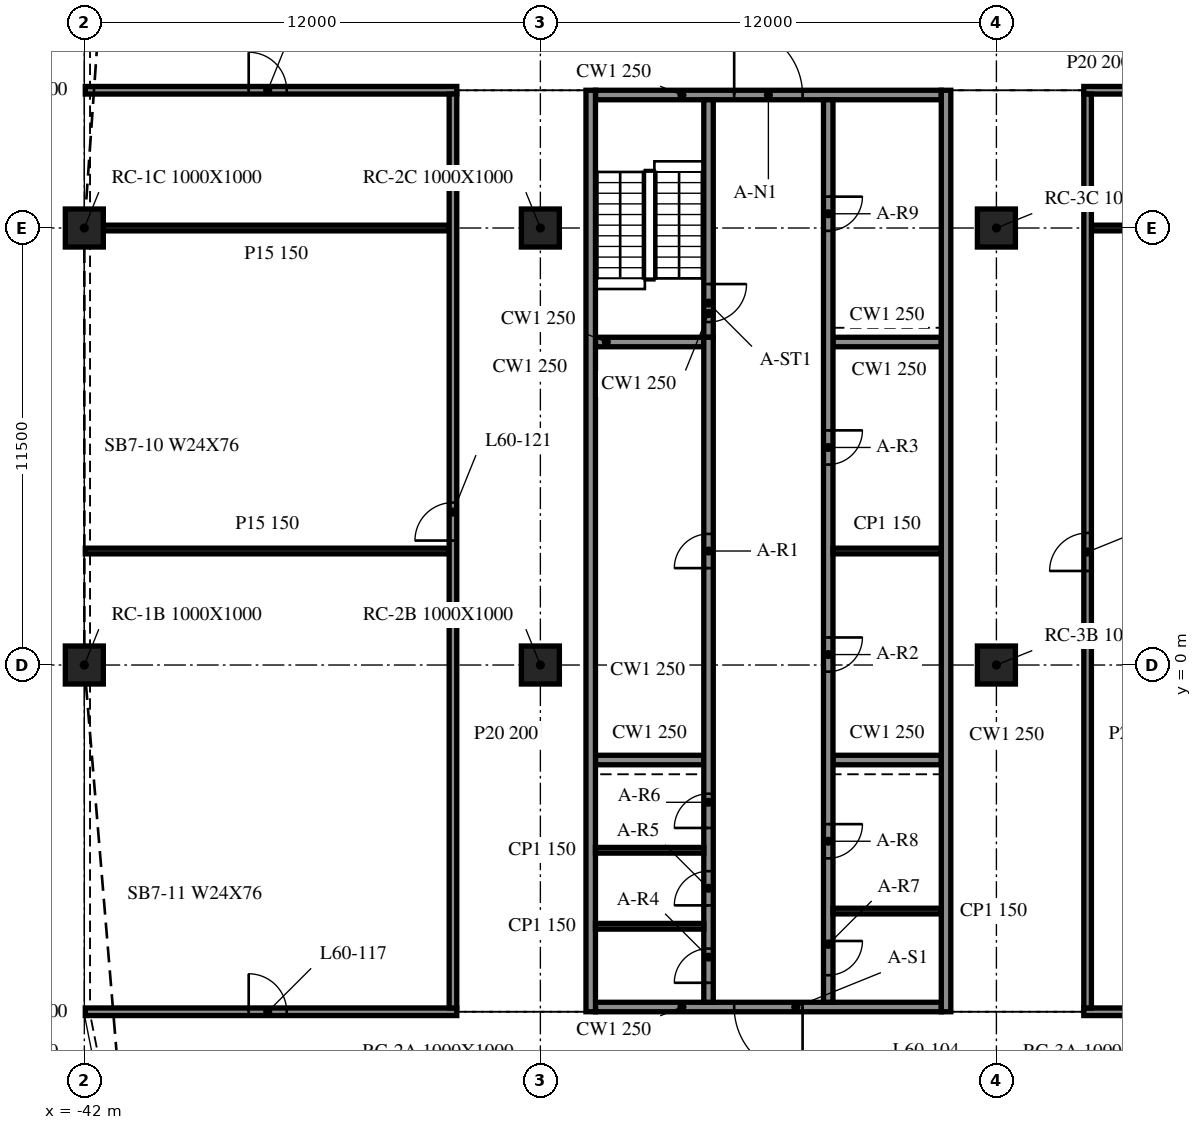
"""IFC4 building model, lengths in metres.
Left out: names, types, materials, properties, quantities, classifications, styles, units other than length and angle.
Written with IfcOpenShell. Run it as: python <this file> out.ifc"""

import sys

from ifc_helpers import new_model, si_unit, direction, frame, frame_2d, origin, origin_2d, place, context, subcontext, project, spatial, rectangle, extrude, element, fill, save


model = new_model("IFC4")
c1 = context("Model", 3, precision=1e-05, world=origin(), true_north=direction((0.0, 1.0)))
c2 = subcontext(c1, "Body", "Model", "MODEL_VIEW")
j1 = project(units=[si_unit("LENGTHUNIT", "METRE"), si_unit("PLANEANGLEUNIT", "RADIAN")], contexts=[c1])
p1 = place(None, origin())
s1 = spatial("IfcSite", under=j1, at=p1, CompositionType="ELEMENT")
p2 = place(p1, origin())
s2 = spatial("IfcBuilding", under=s1, at=p2, CompositionType="ELEMENT")
p3 = place(p2, frame((0.0, 0.0, 247.6)))
s3 = spatial("IfcBuildingStorey", under=s2, at=p3, CompositionType="ELEMENT", Elevation=247.6)
for number, where, z_axis, x_axis in (
    (1, (-42.0, 0.0, -0.34), (0.0, 0.0, 1.0), (1.0, 0.0, 0.0)),
    (2, (-42.0, 11.5, -0.34), (0.0, 0.0, 1.0), (1.0, 0.0, 0.0)),
    (3, (-30.0, 0.0, -0.34), (0.0, 0.0, 1.0), (1.0, 0.0, 0.0)),
    (4, (-30.0, 11.5, -0.34), (0.0, 0.0, 1.0), (1.0, 0.0, 0.0)),
    (5, (-18.0, 0.0, -0.34), (0.0, 0.0, 1.0), (1.0, 0.0, 0.0)),
    (6, (-18.0, 11.5, -0.34), (0.0, 0.0, 1.0), (1.0, 0.0, 0.0)),
):
    element("IfcColumn", number, at=place(p3, frame(where, z_axis=z_axis, x_axis=x_axis)), inside=s3, PredefinedType="COLUMN", context=c2, shape_type="SweptSolid", body=[
        extrude(rectangle(XDim=1.0, YDim=1.0, at=origin_2d()), origin(), (0.0, 0.0, 1.0), 3.8),
    ])
for number, where, z_axis, x_axis in (
    (7, (-28.675, 15.125, 0.0), (0.0, 0.0, 1.0), (0.0, -1.0, 0.0)),
    (8, (-19.325, -9.125, 0.0), (0.0, 0.0, 1.0), (0.0, 1.0, 0.0)),
):
    element("IfcWall", number, at=place(p3, frame(where, z_axis=z_axis, x_axis=x_axis)), inside=s3, PredefinedType="SOLIDWALL", context=c2, shape_type="SweptSolid", body=[
        extrude(rectangle(XDim=24.25, YDim=0.25, at=frame_2d((12.125, 0.0))), origin(), (0.0, 0.0, 1.0), 3.46),
    ])
p4 = place(p3, frame((-19.45, -9.0, 0.0), z_axis=(0.0, 0.0, 1.0), x_axis=(-1.0, 0.0, 0.0)))
e9 = element("IfcWall", 9, at=p4, inside=s3, PredefinedType="SOLIDWALL", context=c2, shape_type="SweptSolid", body=[
    extrude(rectangle(XDim=9.1, YDim=0.25, at=frame_2d((4.55, 0.0))), origin(), (0.0, 0.0, 1.0), 3.46),
])
p5 = place(p4, frame((3.65, 0.0, 0.0)))
e10 = element("IfcOpeningElement", 10, at=p5, cuts=e9, PredefinedType="OPENING", context=c2, shape_type="SweptSolid", body=[
    extrude(rectangle(XDim=1.8, YDim=2.1, at=frame_2d((0.9, 1.05))), frame((0.0, 0.135, 0.0), z_axis=(0.0, -1.0, 0.0), x_axis=(1.0, 0.0, 0.0)), (0.0, 0.0, 1.0), 0.27),
])
p6 = place(p3, frame((-28.55, 15.0, 0.0), z_axis=(0.0, 0.0, 1.0), x_axis=(1.0, 0.0, 0.0)))
e11 = element("IfcWall", 11, at=p6, inside=s3, PredefinedType="SOLIDWALL", context=c2, shape_type="SweptSolid", body=[
    extrude(rectangle(XDim=9.1, YDim=0.25, at=frame_2d((4.55, 0.0))), origin(), (0.0, 0.0, 1.0), 3.46),
])
p7 = place(p6, frame((3.65, 0.0, 0.0)))
e12 = element("IfcOpeningElement", 12, at=p7, cuts=e11, PredefinedType="OPENING", context=c2, shape_type="SweptSolid", body=[
    extrude(rectangle(XDim=1.8, YDim=2.1, at=frame_2d((0.9, 1.05))), frame((0.0, 0.135, 0.0), z_axis=(0.0, -1.0, 0.0), x_axis=(1.0, 0.0, 0.0)), (0.0, 0.0, 1.0), 0.27),
])
p8 = place(p3, frame((-25.575, -8.875, 0.0), z_axis=(0.0, 0.0, 1.0), x_axis=(0.0, 1.0, 0.0)))
e13 = element("IfcWall", 13, at=p8, inside=s3, PredefinedType="SOLIDWALL", context=c2, shape_type="SweptSolid", body=[
    extrude(rectangle(XDim=17.5, YDim=0.25, at=frame_2d((8.75, 0.0))), origin(), (0.0, 0.0, 1.0), 3.46),
])
p9 = place(p8, frame((11.425, 0.0, 0.0)))
e14 = element("IfcOpeningElement", 14, at=p9, cuts=e13, PredefinedType="OPENING", context=c2, shape_type="SweptSolid", body=[
    extrude(rectangle(XDim=0.9, YDim=2.1, at=frame_2d((0.45, 1.05))), frame((0.0, 0.135, 0.0), z_axis=(0.0, -1.0, 0.0), x_axis=(1.0, 0.0, 0.0)), (0.0, 0.0, 1.0), 0.27),
])
p10 = place(p8, frame((0.512, 0.0, 0.0)))
e15 = element("IfcOpeningElement", 15, at=p10, cuts=e13, PredefinedType="OPENING", context=c2, shape_type="SweptSolid", body=[
    extrude(rectangle(XDim=0.9, YDim=2.1, at=frame_2d((0.45, 1.05))), frame((0.0, 0.135, 0.0), z_axis=(0.0, -1.0, 0.0), x_axis=(1.0, 0.0, 0.0)), (0.0, 0.0, 1.0), 0.27),
])
p11 = place(p8, frame((2.55, 0.0, 0.0)))
e16 = element("IfcOpeningElement", 16, at=p11, cuts=e13, PredefinedType="OPENING", context=c2, shape_type="SweptSolid", body=[
    extrude(rectangle(XDim=0.9, YDim=2.1, at=frame_2d((0.45, 1.05))), frame((0.0, 0.135, 0.0), z_axis=(0.0, -1.0, 0.0), x_axis=(1.0, 0.0, 0.0)), (0.0, 0.0, 1.0), 0.27),
])
p12 = place(p8, frame((4.587, 0.0, 0.0)))
e17 = element("IfcOpeningElement", 17, at=p12, cuts=e13, PredefinedType="OPENING", context=c2, shape_type="SweptSolid", body=[
    extrude(rectangle(XDim=0.9, YDim=2.1, at=frame_2d((0.45, 1.05))), frame((0.0, 0.135, 0.0), z_axis=(0.0, -1.0, 0.0), x_axis=(1.0, 0.0, 0.0)), (0.0, 0.0, 1.0), 0.27),
])
p13 = place(p3, frame((-25.575, 14.875, 0.0), z_axis=(0.0, 0.0, 1.0), x_axis=(0.0, -1.0, 0.0)))
e18 = element("IfcWall", 18, at=p13, inside=s3, PredefinedType="SOLIDWALL", context=c2, shape_type="SweptSolid", body=[
    extrude(rectangle(XDim=6.25, YDim=0.25, at=frame_2d((3.125, 0.0))), origin(), (0.0, 0.0, 1.0), 3.46),
])
p14 = place(p13, frame((4.85, 0.0, 0.0)))
e19 = element("IfcOpeningElement", 19, at=p14, cuts=e18, PredefinedType="OPENING", context=c2, shape_type="SweptSolid", body=[
    extrude(rectangle(XDim=1.0, YDim=2.1, at=frame_2d((0.5, 1.05))), frame((0.0, 0.135, 0.0), z_axis=(0.0, -1.0, 0.0), x_axis=(1.0, 0.0, 0.0)), (0.0, 0.0, 1.0), 0.27),
])
p15 = place(p3, frame((-22.425, 14.875, 0.0), z_axis=(0.0, 0.0, 1.0), x_axis=(0.0, -1.0, 0.0)))
e20 = element("IfcWall", 20, at=p15, inside=s3, PredefinedType="SOLIDWALL", context=c2, shape_type="SweptSolid", body=[
    extrude(rectangle(XDim=23.75, YDim=0.25, at=frame_2d((11.875, 0.0))), origin(), (0.0, 0.0, 1.0), 3.46),
])
p16 = place(p15, frame((14.15, 0.0, 0.0)))
e21 = element("IfcOpeningElement", 21, at=p16, cuts=e20, PredefinedType="OPENING", context=c2, shape_type="SweptSolid", body=[
    extrude(rectangle(XDim=0.9, YDim=2.1, at=frame_2d((0.45, 1.05))), frame((0.0, 0.135, 0.0), z_axis=(0.0, -1.0, 0.0), x_axis=(1.0, 0.0, 0.0)), (0.0, 0.0, 1.0), 0.27),
])
p17 = place(p15, frame((8.7, 0.0, 0.0)))
e22 = element("IfcOpeningElement", 22, at=p17, cuts=e20, PredefinedType="OPENING", context=c2, shape_type="SweptSolid", body=[
    extrude(rectangle(XDim=0.9, YDim=2.1, at=frame_2d((0.45, 1.05))), frame((0.0, 0.135, 0.0), z_axis=(0.0, -1.0, 0.0), x_axis=(1.0, 0.0, 0.0)), (0.0, 0.0, 1.0), 0.27),
])
p18 = place(p15, frame((22.137, 0.0, 0.0)))
e23 = element("IfcOpeningElement", 23, at=p18, cuts=e20, PredefinedType="OPENING", context=c2, shape_type="SweptSolid", body=[
    extrude(rectangle(XDim=0.9, YDim=2.1, at=frame_2d((0.45, 1.05))), frame((0.0, 0.135, 0.0), z_axis=(0.0, -1.0, 0.0), x_axis=(1.0, 0.0, 0.0)), (0.0, 0.0, 1.0), 0.27),
])
p19 = place(p15, frame((19.062, 0.0, 0.0)))
e24 = element("IfcOpeningElement", 24, at=p19, cuts=e20, PredefinedType="OPENING", context=c2, shape_type="SweptSolid", body=[
    extrude(rectangle(XDim=0.9, YDim=2.1, at=frame_2d((0.45, 1.05))), frame((0.0, 0.135, 0.0), z_axis=(0.0, -1.0, 0.0), x_axis=(1.0, 0.0, 0.0)), (0.0, 0.0, 1.0), 0.27),
])
p20 = place(p15, frame((2.55, 0.0, 0.0)))
e25 = element("IfcOpeningElement", 25, at=p20, cuts=e20, PredefinedType="OPENING", context=c2, shape_type="SweptSolid", body=[
    extrude(rectangle(XDim=0.9, YDim=2.1, at=frame_2d((0.45, 1.05))), frame((0.0, 0.135, 0.0), z_axis=(0.0, -1.0, 0.0), x_axis=(1.0, 0.0, 0.0)), (0.0, 0.0, 1.0), 0.27),
])
for number, where, z_axis, x_axis in (
    (26, (-28.55, -2.5, 0.0), (0.0, 0.0, 1.0), (1.0, 0.0, 0.0)),
    (27, (-28.55, 8.5, 0.0), (0.0, 0.0, 1.0), (1.0, 0.0, 0.0)),
    (28, (-22.3, -2.5, 0.0), (0.0, 0.0, 1.0), (1.0, 0.0, 0.0)),
    (29, (-22.3, 8.5, 0.0), (0.0, 0.0, 1.0), (1.0, 0.0, 0.0)),
):
    element("IfcWall", number, at=place(p3, frame(where, z_axis=z_axis, x_axis=x_axis)), inside=s3, PredefinedType="SOLIDWALL", context=c2, shape_type="SweptSolid", body=[
        extrude(rectangle(XDim=2.85, YDim=0.25, at=frame_2d((1.425, 0.0))), origin(), (0.0, 0.0, 1.0), 3.46),
    ])
for number, where, z_axis, x_axis in (
    (30, (-22.3, 3.0, 0.0), (0.0, 0.0, 1.0), (1.0, 0.0, 0.0)),
    (31, (-28.55, -6.875, 0.0), (0.0, 0.0, 1.0), (1.0, 0.0, 0.0)),
    (32, (-28.55, -4.875, 0.0), (0.0, 0.0, 1.0), (1.0, 0.0, 0.0)),
    (33, (-22.3, -6.475, 0.0), (0.0, 0.0, 1.0), (1.0, 0.0, 0.0)),
):
    element("IfcWall", number, at=place(p3, frame(where, z_axis=z_axis, x_axis=x_axis)), inside=s3, PredefinedType="PARTITIONING", context=c2, shape_type="SweptSolid", body=[
        extrude(rectangle(XDim=2.85, YDim=0.15, at=frame_2d((1.425, 0.0))), origin(), (0.0, 0.0, 1.0), 3.46),
    ])
p21 = place(p3, frame((-41.975, -9.125, 0.0), z_axis=(0.0, 0.0, 1.0), x_axis=(1.0, 0.0, 0.0)))
e34 = element("IfcWall", 34, at=p21, inside=s3, PredefinedType="PARTITIONING", context=c2, shape_type="SweptSolid", body=[
    extrude(rectangle(XDim=9.775, YDim=0.2, at=frame_2d((4.888, 0.0))), origin(), (0.0, 0.0, 1.0), 3.46),
])
p22 = place(p21, frame((4.3, 0.0, 0.0)))
e35 = element("IfcOpeningElement", 35, at=p22, cuts=e34, PredefinedType="OPENING", context=c2, shape_type="SweptSolid", body=[
    extrude(rectangle(XDim=1.0, YDim=2.1, at=frame_2d((0.5, 1.05))), frame((0.0, 0.11, 0.0), z_axis=(0.0, -1.0, 0.0), x_axis=(1.0, 0.0, 0.0)), (0.0, 0.0, 1.0), 0.22),
])
p23 = place(p3, frame((-15.7, -9.125, 0.0), z_axis=(0.0, 0.0, 1.0), x_axis=(1.0, 0.0, 0.0)))
e36 = element("IfcWall", 36, at=p23, inside=s3, PredefinedType="PARTITIONING", context=c2, shape_type="SweptSolid", body=[
    extrude(rectangle(XDim=7.3, YDim=0.2, at=frame_2d((3.65, 0.0))), origin(), (0.0, 0.0, 1.0), 3.46),
])
p24 = place(p3, frame((-41.975, 3.0, 0.0), z_axis=(0.0, 0.0, 1.0), x_axis=(1.0, 0.0, 0.0)))
e37 = element("IfcWall", 37, at=p24, inside=s3, PredefinedType="PARTITIONING", context=c2, shape_type="SweptSolid", body=[
    extrude(rectangle(XDim=9.575, YDim=0.15, at=frame_2d((4.788, 0.0))), origin(), (0.0, 0.0, 1.0), 3.46),
])
p25 = place(p3, frame((-41.5, 11.5, 0.0), z_axis=(0.0, 0.0, 1.0), x_axis=(1.0, 0.0, 0.0)))
e38 = element("IfcWall", 38, at=p25, inside=s3, PredefinedType="PARTITIONING", context=c2, shape_type="SweptSolid", body=[
    extrude(rectangle(XDim=9.1, YDim=0.15, at=frame_2d((4.55, 0.0))), origin(), (0.0, 0.0, 1.0), 3.46),
])
p26 = place(p3, frame((-15.5, 11.5, 0.0), z_axis=(0.0, 0.0, 1.0), x_axis=(1.0, 0.0, 0.0)))
e39 = element("IfcWall", 39, at=p26, inside=s3, PredefinedType="PARTITIONING", context=c2, shape_type="SweptSolid", body=[
    extrude(rectangle(XDim=6.9, YDim=0.15, at=frame_2d((3.45, 0.0))), origin(), (0.0, 0.0, 1.0), 3.46),
])
p27 = place(p3, frame((-41.975, 15.125, 0.0), z_axis=(0.0, 0.0, 1.0), x_axis=(1.0, 0.0, 0.0)))
e40 = element("IfcWall", 40, at=p27, inside=s3, PredefinedType="PARTITIONING", context=c2, shape_type="SweptSolid", body=[
    extrude(rectangle(XDim=9.775, YDim=0.2, at=frame_2d((4.888, 0.0))), origin(), (0.0, 0.0, 1.0), 3.46),
])
p28 = place(p27, frame((4.3, 0.0, 0.0)))
e41 = element("IfcOpeningElement", 41, at=p28, cuts=e40, PredefinedType="OPENING", context=c2, shape_type="SweptSolid", body=[
    extrude(rectangle(XDim=1.0, YDim=2.1, at=frame_2d((0.5, 1.05))), frame((0.0, 0.11, 0.0), z_axis=(0.0, -1.0, 0.0), x_axis=(1.0, 0.0, 0.0)), (0.0, 0.0, 1.0), 0.22),
])
p29 = place(p3, frame((-15.7, 15.125, 0.0), z_axis=(0.0, 0.0, 1.0), x_axis=(1.0, 0.0, 0.0)))
e42 = element("IfcWall", 42, at=p29, inside=s3, PredefinedType="PARTITIONING", context=c2, shape_type="SweptSolid", body=[
    extrude(rectangle(XDim=7.3, YDim=0.2, at=frame_2d((3.65, 0.0))), origin(), (0.0, 0.0, 1.0), 3.46),
])
p30 = place(p29, frame((3.1, 0.0, 0.0)))
e43 = element("IfcOpeningElement", 43, at=p30, cuts=e42, PredefinedType="OPENING", context=c2, shape_type="SweptSolid", body=[
    extrude(rectangle(XDim=0.9, YDim=2.1, at=frame_2d((0.45, 1.05))), frame((0.0, 0.11, 0.0), z_axis=(0.0, -1.0, 0.0), x_axis=(1.0, 0.0, 0.0)), (0.0, 0.0, 1.0), 0.22),
])
p31 = place(p3, frame((-32.3, -9.025, 0.0), z_axis=(0.0, 0.0, 1.0), x_axis=(0.0, 1.0, 0.0)))
e44 = element("IfcWall", 44, at=p31, inside=s3, PredefinedType="PARTITIONING", context=c2, shape_type="SweptSolid", body=[
    extrude(rectangle(XDim=24.05, YDim=0.2, at=frame_2d((12.025, 0.0))), origin(), (0.0, 0.0, 1.0), 3.46),
])
p32 = place(p31, frame((12.3, 0.0, 0.0)))
e45 = element("IfcOpeningElement", 45, at=p32, cuts=e44, PredefinedType="OPENING", context=c2, shape_type="SweptSolid", body=[
    extrude(rectangle(XDim=1.0, YDim=2.1, at=frame_2d((0.5, 1.05))), frame((0.0, 0.11, 0.0), z_axis=(0.0, -1.0, 0.0), x_axis=(1.0, 0.0, 0.0)), (0.0, 0.0, 1.0), 0.22),
])
p33 = place(p3, frame((-15.6, -9.025, 0.0), z_axis=(0.0, 0.0, 1.0), x_axis=(0.0, 1.0, 0.0)))
e46 = element("IfcWall", 46, at=p33, inside=s3, PredefinedType="PARTITIONING", context=c2, shape_type="SweptSolid", body=[
    extrude(rectangle(XDim=24.05, YDim=0.2, at=frame_2d((12.025, 0.0))), origin(), (0.0, 0.0, 1.0), 3.46),
])
p34 = place(p33, frame((11.5, 0.0, 0.0)))
e47 = element("IfcOpeningElement", 47, at=p34, cuts=e46, PredefinedType="OPENING", context=c2, shape_type="SweptSolid", body=[
    extrude(rectangle(XDim=1.0, YDim=2.1, at=frame_2d((0.5, 1.05))), frame((0.0, 0.11, 0.0), z_axis=(0.0, -1.0, 0.0), x_axis=(1.0, 0.0, 0.0)), (0.0, 0.0, 1.0), 0.22),
])
p35 = place(p5, origin())
e48 = element("IfcDoor", 48, at=p35, inside=s3, OperationType="DOUBLE_DOOR_SINGLE_SWING", PredefinedType="DOOR", context=c2, shape_type="SweptSolid", body=[
    extrude(rectangle(XDim=1.8, YDim=2.1, at=frame_2d((0.9, 1.05))), frame((0.0, 0.025, 0.0), z_axis=(0.0, -1.0, 0.0), x_axis=(1.0, 0.0, 0.0)), (0.0, 0.0, 1.0), 0.05),
])
fill(e10, e48)
p36 = place(p7, origin())
e49 = element("IfcDoor", 49, at=p36, inside=s3, OperationType="DOUBLE_DOOR_SINGLE_SWING", PredefinedType="DOOR", context=c2, shape_type="SweptSolid", body=[
    extrude(rectangle(XDim=1.8, YDim=2.1, at=frame_2d((0.9, 1.05))), frame((0.0, 0.025, 0.0), z_axis=(0.0, -1.0, 0.0), x_axis=(1.0, 0.0, 0.0)), (0.0, 0.0, 1.0), 0.05),
])
fill(e12, e49)
p37 = place(p9, origin())
e50 = element("IfcDoor", 50, at=p37, inside=s3, OperationType="SINGLE_SWING_LEFT", PredefinedType="DOOR", context=c2, shape_type="SweptSolid", body=[
    extrude(rectangle(XDim=0.9, YDim=2.1, at=frame_2d((0.45, 1.05))), frame((0.0, 0.025, 0.0), z_axis=(0.0, -1.0, 0.0), x_axis=(1.0, 0.0, 0.0)), (0.0, 0.0, 1.0), 0.05),
])
fill(e14, e50)
p38 = place(p16, origin())
e51 = element("IfcDoor", 51, at=p38, inside=s3, OperationType="SINGLE_SWING_RIGHT", PredefinedType="DOOR", context=c2, shape_type="SweptSolid", body=[
    extrude(rectangle(XDim=0.9, YDim=2.1, at=frame_2d((0.45, 1.05))), frame((0.0, 0.025, 0.0), z_axis=(0.0, -1.0, 0.0), x_axis=(1.0, 0.0, 0.0)), (0.0, 0.0, 1.0), 0.05),
])
fill(e21, e51)
p39 = place(p17, origin())
e52 = element("IfcDoor", 52, at=p39, inside=s3, OperationType="SINGLE_SWING_LEFT", PredefinedType="DOOR", context=c2, shape_type="SweptSolid", body=[
    extrude(rectangle(XDim=0.9, YDim=2.1, at=frame_2d((0.45, 1.05))), frame((0.0, 0.025, 0.0), z_axis=(0.0, -1.0, 0.0), x_axis=(1.0, 0.0, 0.0)), (0.0, 0.0, 1.0), 0.05),
])
fill(e22, e52)
p40 = place(p10, origin())
e53 = element("IfcDoor", 53, at=p40, inside=s3, OperationType="SINGLE_SWING_RIGHT", PredefinedType="DOOR", context=c2, shape_type="SweptSolid", body=[
    extrude(rectangle(XDim=0.9, YDim=2.1, at=frame_2d((0.45, 1.05))), frame((0.0, 0.025, 0.0), z_axis=(0.0, -1.0, 0.0), x_axis=(1.0, 0.0, 0.0)), (0.0, 0.0, 1.0), 0.05),
])
fill(e15, e53)
p41 = place(p11, origin())
e54 = element("IfcDoor", 54, at=p41, inside=s3, OperationType="SINGLE_SWING_LEFT", PredefinedType="DOOR", context=c2, shape_type="SweptSolid", body=[
    extrude(rectangle(XDim=0.9, YDim=2.1, at=frame_2d((0.45, 1.05))), frame((0.0, 0.025, 0.0), z_axis=(0.0, -1.0, 0.0), x_axis=(1.0, 0.0, 0.0)), (0.0, 0.0, 1.0), 0.05),
])
fill(e16, e54)
p42 = place(p12, origin())
e55 = element("IfcDoor", 55, at=p42, inside=s3, OperationType="SINGLE_SWING_RIGHT", PredefinedType="DOOR", context=c2, shape_type="SweptSolid", body=[
    extrude(rectangle(XDim=0.9, YDim=2.1, at=frame_2d((0.45, 1.05))), frame((0.0, 0.025, 0.0), z_axis=(0.0, -1.0, 0.0), x_axis=(1.0, 0.0, 0.0)), (0.0, 0.0, 1.0), 0.05),
])
fill(e17, e55)
p43 = place(p18, origin())
e56 = element("IfcDoor", 56, at=p43, inside=s3, OperationType="SINGLE_SWING_LEFT", PredefinedType="DOOR", context=c2, shape_type="SweptSolid", body=[
    extrude(rectangle(XDim=0.9, YDim=2.1, at=frame_2d((0.45, 1.05))), frame((0.0, 0.025, 0.0), z_axis=(0.0, -1.0, 0.0), x_axis=(1.0, 0.0, 0.0)), (0.0, 0.0, 1.0), 0.05),
])
fill(e23, e56)
p44 = place(p19, origin())
e57 = element("IfcDoor", 57, at=p44, inside=s3, OperationType="SINGLE_SWING_RIGHT", PredefinedType="DOOR", context=c2, shape_type="SweptSolid", body=[
    extrude(rectangle(XDim=0.9, YDim=2.1, at=frame_2d((0.45, 1.05))), frame((0.0, 0.025, 0.0), z_axis=(0.0, -1.0, 0.0), x_axis=(1.0, 0.0, 0.0)), (0.0, 0.0, 1.0), 0.05),
])
fill(e24, e57)
p45 = place(p20, origin())
e58 = element("IfcDoor", 58, at=p45, inside=s3, OperationType="SINGLE_SWING_LEFT", PredefinedType="DOOR", context=c2, shape_type="SweptSolid", body=[
    extrude(rectangle(XDim=0.9, YDim=2.1, at=frame_2d((0.45, 1.05))), frame((0.0, 0.025, 0.0), z_axis=(0.0, -1.0, 0.0), x_axis=(1.0, 0.0, 0.0)), (0.0, 0.0, 1.0), 0.05),
])
fill(e25, e58)
p46 = place(p14, origin())
e59 = element("IfcDoor", 59, at=p46, inside=s3, OperationType="SINGLE_SWING_RIGHT", PredefinedType="DOOR", context=c2, shape_type="SweptSolid", body=[
    extrude(rectangle(XDim=1.0, YDim=2.1, at=frame_2d((0.5, 1.05))), frame((0.0, 0.025, 0.0), z_axis=(0.0, -1.0, 0.0), x_axis=(1.0, 0.0, 0.0)), (0.0, 0.0, 1.0), 0.05),
])
fill(e19, e59)
p47 = place(p22, origin())
e60 = element("IfcDoor", 60, at=p47, inside=s3, OperationType="SINGLE_SWING_LEFT", PredefinedType="DOOR", context=c2, shape_type="SweptSolid", body=[
    extrude(rectangle(XDim=1.0, YDim=2.1, at=frame_2d((0.5, 1.05))), frame((0.0, 0.025, 0.0), z_axis=(0.0, -1.0, 0.0), x_axis=(1.0, 0.0, 0.0)), (0.0, 0.0, 1.0), 0.05),
])
fill(e35, e60)
p48 = place(p34, origin())
e61 = element("IfcDoor", 61, at=p48, inside=s3, OperationType="SINGLE_SWING_RIGHT", PredefinedType="DOOR", context=c2, shape_type="SweptSolid", body=[
    extrude(rectangle(XDim=1.0, YDim=2.1, at=frame_2d((0.5, 1.05))), frame((0.0, 0.025, 0.0), z_axis=(0.0, -1.0, 0.0), x_axis=(1.0, 0.0, 0.0)), (0.0, 0.0, 1.0), 0.05),
])
fill(e47, e61)
p49 = place(p32, origin())
e62 = element("IfcDoor", 62, at=p49, inside=s3, OperationType="SINGLE_SWING_RIGHT", PredefinedType="DOOR", context=c2, shape_type="SweptSolid", body=[
    extrude(rectangle(XDim=1.0, YDim=2.1, at=frame_2d((0.5, 1.05))), frame((0.0, 0.025, 0.0), z_axis=(0.0, -1.0, 0.0), x_axis=(1.0, 0.0, 0.0)), (0.0, 0.0, 1.0), 0.05),
])
fill(e45, e62)
p50 = place(p28, origin())
e63 = element("IfcDoor", 63, at=p50, inside=s3, OperationType="SINGLE_SWING_RIGHT", PredefinedType="DOOR", context=c2, shape_type="SweptSolid", body=[
    extrude(rectangle(XDim=1.0, YDim=2.1, at=frame_2d((0.5, 1.05))), frame((0.0, 0.025, 0.0), z_axis=(0.0, -1.0, 0.0), x_axis=(1.0, 0.0, 0.0)), (0.0, 0.0, 1.0), 0.05),
])
fill(e41, e63)
save(model, sys.argv[1])
